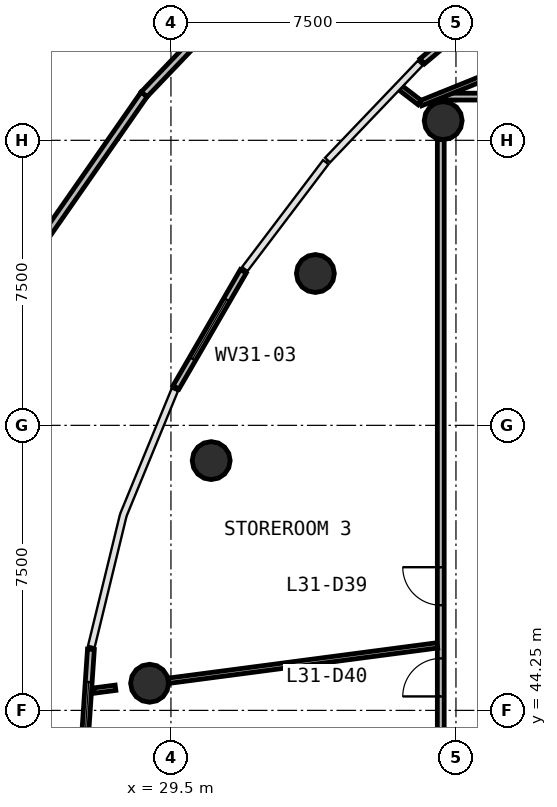
"""IFC4 building model, lengths in metres.
Left out: names, types, materials, properties, quantities, classifications, styles, units other than length and angle.
Written with IfcOpenShell. Run it as: python <this file> out.ifc"""

import sys

from ifc_helpers import new_model, si_unit, direction, frame, frame_2d, origin, origin_2d, place, context, subcontext, project, spatial, rectangle, circle, extrude, source, transform, mapped, element, fill, save


model = new_model("IFC4")
c1 = context("Model", 3, precision=1e-05, world=origin(), true_north=direction((0.0, 1.0)))
c2 = subcontext(c1, "Body", "Model", "MODEL_VIEW")
j1 = project(units=[si_unit("LENGTHUNIT", "METRE"), si_unit("PLANEANGLEUNIT", "RADIAN")], contexts=[c1])
p1 = place(None, origin())
s1 = spatial("IfcSite", under=j1, at=p1, CompositionType="ELEMENT")
p2 = place(p1, origin())
s2 = spatial("IfcBuilding", under=s1, at=p2, CompositionType="ELEMENT")
p3 = place(p2, frame((0.0, 0.0, 133.1)))
s3 = spatial("IfcBuildingStorey", under=s2, at=p3, CompositionType="ELEMENT", Elevation=133.1)
m1 = source(origin(), c2, "Body", "SweptSolid", [
    extrude(circle(Radius=0.5, at=origin_2d()), origin(), (0.0, 0.0, 1.0), 4.22),
])
for number, where, z_axis, x_axis in (
    (1, (36.664, 59.768, -0.32), (0.0, 0.0, 1.0), (1.0, 0.0, 0.0)),
    (2, (33.301, 55.746, -0.32), (0.0, 0.0, 1.0), (1.0, 0.0, 0.0)),
    (3, (30.559, 50.823, -0.32), (0.0, 0.0, 1.0), (1.0, 0.0, 0.0)),
    (4, (28.938, 44.964, -0.32), (0.0, 0.0, 1.0), (1.0, 0.0, 0.0)),
):
    element("IfcColumn", number, at=place(p3, frame(where, z_axis=z_axis, x_axis=x_axis)), inside=s3, PredefinedType="COLUMN", context=c2, shape_type="MappedRepresentation", body=[
        mapped(m1, transform((0.0, 0.0, 0.0), scale=1.0)),
    ])
p4 = place(p3, frame((38.813, 63.602, 0.0), z_axis=(0.0, 0.0, 1.0), x_axis=(-0.765266094185, -0.643714070913, 0.0)))
e5 = element("IfcWall", 5, at=p4, inside=s3, PredefinedType="STANDARD", context=c2, shape_type="SweptSolid", body=[
    extrude(rectangle(XDim=3.531, YDim=0.18, at=frame_2d((1.766, 0.0))), origin(), (0.0, 0.0, 1.0), 3.58),
])
p5 = place(p4, frame((0.865, 0.0, 0.9)))
e6 = element("IfcOpeningElement", 6, at=p5, cuts=e5, PredefinedType="OPENING", context=c2, shape_type="SweptSolid", body=[
    extrude(rectangle(XDim=1.8, YDim=2.1, at=frame_2d((0.9, 1.05))), frame((0.0, 0.1, 0.0), z_axis=(0.0, -1.0, 0.0), x_axis=(1.0, 0.0, 0.0)), (0.0, 0.0, 1.0), 0.2),
])
p6 = place(p3, frame((31.404, 55.804, 0.0), z_axis=(0.0, 0.0, 1.0), x_axis=(-0.501551441293, -0.865127823929, 0.0)))
e7 = element("IfcWall", 7, at=p6, inside=s3, PredefinedType="STANDARD", context=c2, shape_type="SweptSolid", body=[
    extrude(rectangle(XDim=3.53, YDim=0.18, at=frame_2d((1.765, 0.0))), origin(), (0.0, 0.0, 1.0), 3.58),
])
p7 = place(p6, frame((0.865, 0.0, 0.9)))
e8 = element("IfcOpeningElement", 8, at=p7, cuts=e7, PredefinedType="OPENING", context=c2, shape_type="SweptSolid", body=[
    extrude(rectangle(XDim=1.8, YDim=2.1, at=frame_2d((0.9, 1.05))), frame((0.0, 0.1, 0.0), z_axis=(0.0, -1.0, 0.0), x_axis=(1.0, 0.0, 0.0)), (0.0, 0.0, 1.0), 0.2),
])
p8 = place(p3, frame((27.394, 45.859, 0.0), z_axis=(0.0, 0.0, 1.0), x_axis=(-0.067272341836, -0.997734650107, 0.0)))
e9 = element("IfcWall", 9, at=p8, inside=s3, PredefinedType="STANDARD", context=c2, shape_type="SweptSolid", body=[
    extrude(rectangle(XDim=3.528, YDim=0.18, at=frame_2d((1.764, 0.0))), origin(), (0.0, 0.0, 1.0), 3.58),
])
p9 = place(p8, frame((0.864, 0.0, 0.9)))
e10 = element("IfcOpeningElement", 10, at=p9, cuts=e9, PredefinedType="OPENING", context=c2, shape_type="SweptSolid", body=[
    extrude(rectangle(XDim=1.8, YDim=2.1, at=frame_2d((0.9, 1.05))), frame((0.0, 0.1, 0.0), z_axis=(0.0, -1.0, 0.0), x_axis=(1.0, 0.0, 0.0)), (0.0, 0.0, 1.0), 0.2),
])
p10 = place(p3, frame((25.448, 55.653, 0.0), z_axis=(0.0, 0.0, 1.0), x_axis=(0.571368470794, 0.820693652091, 0.0)))
e11 = element("IfcWall", 11, at=p10, inside=s3, PredefinedType="PARAPET", context=c2, shape_type="SweptSolid", body=[
    extrude(rectangle(XDim=5.859, YDim=0.2, at=frame_2d((2.929, 0.0))), origin(), (0.0, 0.0, 1.0), 1.1),
])
p11 = place(p3, frame((28.796, 60.461, 0.0), z_axis=(0.0, 0.0, 1.0), x_axis=(0.690863095069, 0.722985604194, 0.0)))
e12 = element("IfcWall", 12, at=p11, inside=s3, PredefinedType="PARAPET", context=c2, shape_type="SweptSolid", body=[
    extrude(rectangle(XDim=5.86, YDim=0.2, at=frame_2d((2.93, 0.0))), origin(), (0.0, 0.0, 1.0), 1.1),
])
p12 = place(p3, frame((36.6, 60.4, 0.0), z_axis=(0.0, 0.0, 1.0), x_axis=(1.0, 0.0, 0.0)))
e13 = element("IfcWall", 13, at=p12, inside=s3, PredefinedType="PARTITIONING", context=c2, shape_type="SweptSolid", body=[
    extrude(rectangle(XDim=30.8, YDim=0.18, at=frame_2d((15.4, 0.0))), origin(), (0.0, 0.0, 1.0), 2.88),
])
p13 = place(p12, frame((22.25, 0.0, 0.0)))
e14 = element("IfcOpeningElement", 14, at=p13, cuts=e13, PredefinedType="OPENING", context=c2, shape_type="SweptSolid", body=[
    extrude(rectangle(XDim=0.9, YDim=2.1, at=frame_2d((0.45, 1.05))), frame((0.0, 0.1, 0.0), z_axis=(0.0, -1.0, 0.0), x_axis=(1.0, 0.0, 0.0)), (0.0, 0.0, 1.0), 0.2),
])
p14 = place(p12, frame((19.65, 0.0, 0.0)))
e15 = element("IfcOpeningElement", 15, at=p14, cuts=e13, PredefinedType="OPENING", context=c2, shape_type="SweptSolid", body=[
    extrude(rectangle(XDim=0.9, YDim=2.1, at=frame_2d((0.45, 1.05))), frame((0.0, 0.1, 0.0), z_axis=(0.0, -1.0, 0.0), x_axis=(1.0, 0.0, 0.0)), (0.0, 0.0, 1.0), 0.2),
])
p15 = place(p12, frame((17.25, 0.0, 0.0)))
e16 = element("IfcOpeningElement", 16, at=p15, cuts=e13, PredefinedType="OPENING", context=c2, shape_type="SweptSolid", body=[
    extrude(rectangle(XDim=0.9, YDim=2.1, at=frame_2d((0.45, 1.05))), frame((0.0, 0.1, 0.0), z_axis=(0.0, -1.0, 0.0), x_axis=(1.0, 0.0, 0.0)), (0.0, 0.0, 1.0), 0.2),
])
p16 = place(p12, frame((14.95, 0.0, 0.0)))
e17 = element("IfcOpeningElement", 17, at=p16, cuts=e13, PredefinedType="OPENING", context=c2, shape_type="SweptSolid", body=[
    extrude(rectangle(XDim=1.0, YDim=2.1, at=frame_2d((0.5, 1.05))), frame((0.0, 0.1, 0.0), z_axis=(0.0, -1.0, 0.0), x_axis=(1.0, 0.0, 0.0)), (0.0, 0.0, 1.0), 0.2),
])
p17 = place(p12, frame((8.95, 0.0, 0.0)))
e18 = element("IfcOpeningElement", 18, at=p17, cuts=e13, PredefinedType="OPENING", context=c2, shape_type="SweptSolid", body=[
    extrude(rectangle(XDim=1.0, YDim=2.1, at=frame_2d((0.5, 1.05))), frame((0.0, 0.1, 0.0), z_axis=(0.0, -1.0, 0.0), x_axis=(1.0, 0.0, 0.0)), (0.0, 0.0, 1.0), 0.2),
])
p18 = place(p3, frame((36.6, 35.63, 0.0), z_axis=(0.0, 0.0, 1.0), x_axis=(0.0, 1.0, 0.0)))
e19 = element("IfcWall", 19, at=p18, inside=s3, PredefinedType="PARTITIONING", context=c2, shape_type="SweptSolid", body=[
    extrude(rectangle(XDim=23.638, YDim=0.18, at=frame_2d((11.819, 0.0))), origin(), (0.0, 0.0, 1.0), 2.88),
])
p19 = place(p18, frame((11.387, 0.0, 0.0)))
e20 = element("IfcOpeningElement", 20, at=p19, cuts=e19, PredefinedType="OPENING", context=c2, shape_type="SweptSolid", body=[
    extrude(rectangle(XDim=1.0, YDim=2.1, at=frame_2d((0.5, 1.05))), frame((0.0, 0.1, 0.0), z_axis=(0.0, -1.0, 0.0), x_axis=(1.0, 0.0, 0.0)), (0.0, 0.0, 1.0), 0.2),
])
p20 = place(p18, frame((8.988, 0.0, 0.0)))
e21 = element("IfcOpeningElement", 21, at=p20, cuts=e19, PredefinedType="OPENING", context=c2, shape_type="SweptSolid", body=[
    extrude(rectangle(XDim=1.0, YDim=2.1, at=frame_2d((0.5, 1.05))), frame((0.0, 0.1, 0.0), z_axis=(0.0, -1.0, 0.0), x_axis=(1.0, 0.0, 0.0)), (0.0, 0.0, 1.0), 0.2),
])
p21 = place(p18, frame((4.587, 0.0, 0.0)))
e22 = element("IfcOpeningElement", 22, at=p21, cuts=e19, PredefinedType="OPENING", context=c2, shape_type="SweptSolid", body=[
    extrude(rectangle(XDim=1.0, YDim=2.1, at=frame_2d((0.5, 1.05))), frame((0.0, 0.1, 0.0), z_axis=(0.0, -1.0, 0.0), x_axis=(1.0, 0.0, 0.0)), (0.0, 0.0, 1.0), 0.2),
])
p22 = place(p3, frame((36.51, 45.961, 0.0), z_axis=(0.0, 0.0, 1.0), x_axis=(-0.991447420849, -0.130506749601, 0.0)))
e23 = element("IfcWall", 23, at=p22, inside=s3, PredefinedType="PARTITIONING", context=c2, shape_type="SweptSolid", body=[
    extrude(rectangle(XDim=7.133, YDim=0.14, at=frame_2d((3.566, 0.0))), origin(), (0.0, 0.0, 1.0), 2.88),
])
p23 = place(p3, frame((36.07, 60.223, 0.0), z_axis=(0.0, 0.0, 1.0), x_axis=(0.927241534836, 0.374463798084, 0.0)))
e24 = element("IfcWall", 24, at=p23, inside=s3, PredefinedType="PARTITIONING", context=c2, shape_type="SweptSolid", body=[
    extrude(rectangle(XDim=5.393, YDim=0.14, at=frame_2d((2.697, 0.0))), origin(), (0.0, 0.0, 1.0), 2.88),
])
p24 = place(p23, frame((2.943, 0.0, 0.0)))
e25 = element("IfcOpeningElement", 25, at=p24, cuts=e24, PredefinedType="OPENING", context=c2, shape_type="SweptSolid", body=[
    extrude(rectangle(XDim=1.0, YDim=2.1, at=frame_2d((0.5, 1.05))), frame((0.0, 0.08, 0.0), z_axis=(0.0, -1.0, 0.0), x_axis=(1.0, 0.0, 0.0)), (0.0, 0.0, 1.0), 0.16),
])
p25 = place(p3, frame((28.041, 44.846, 0.0), z_axis=(0.0, 0.0, 1.0), x_axis=(-0.99145719693, -0.130432460129, 0.0)))
e26 = element("IfcWall", 26, at=p25, inside=s3, PredefinedType="PARTITIONING", context=c2, shape_type="SweptSolid", body=[
    extrude(rectangle(XDim=0.573, YDim=0.14, at=frame_2d((0.286, 0.0))), origin(), (0.0, 0.0, 1.0), 2.88),
])
p26 = place(p3, frame((36.046, 60.242, 0.0), z_axis=(0.0, 0.0, 1.0), x_axis=(-0.793476968481, 0.608600279732, 0.0)))
e27 = element("IfcWall", 27, at=p26, inside=s3, PredefinedType="PARTITIONING", context=c2, shape_type="SweptSolid", body=[
    extrude(rectangle(XDim=0.638, YDim=0.14, at=frame_2d((0.319, 0.0))), origin(), (0.0, 0.0, 1.0), 2.88),
])
m2 = source(origin(), c2, "Body", "SweptSolid", [
    extrude(rectangle(XDim=1.8, YDim=2.1, at=frame_2d((0.9, 1.05))), frame((0.0, 0.03, 0.0), z_axis=(0.0, -1.0, 0.0), x_axis=(1.0, 0.0, 0.0)), (0.0, 0.0, 1.0), 0.06),
])
p27 = place(p7, origin())
e28 = element("IfcWindow", 28, at=p27, inside=s3, PartitioningType="SINGLE_PANEL", PredefinedType="WINDOW", context=c2, shape_type="MappedRepresentation", body=[
    mapped(m2, transform((0.0, 0.0, 0.0), scale=1.0)),
])
fill(e8, e28)
p28 = place(p9, origin())
e29 = element("IfcWindow", 29, at=p28, inside=s3, PartitioningType="SINGLE_PANEL", PredefinedType="WINDOW", context=c2, shape_type="MappedRepresentation", body=[
    mapped(m2, transform((0.0, 0.0, 0.0), scale=1.0)),
])
fill(e10, e29)
m3 = source(origin(), c2, "Body", "SweptSolid", [
    extrude(rectangle(XDim=1.0, YDim=2.1, at=frame_2d((0.5, 1.05))), frame((0.0, 0.025, 0.0), z_axis=(0.0, -1.0, 0.0), x_axis=(1.0, 0.0, 0.0)), (0.0, 0.0, 1.0), 0.05),
])
p29 = place(p19, origin())
e30 = element("IfcDoor", 30, at=p29, inside=s3, OperationType="SINGLE_SWING_RIGHT", PredefinedType="DOOR", context=c2, shape_type="MappedRepresentation", body=[
    mapped(m3, transform((0.0, 0.0, 0.0), scale=1.0)),
])
fill(e20, e30)
p30 = place(p20, origin())
e31 = element("IfcDoor", 31, at=p30, inside=s3, OperationType="SINGLE_SWING_LEFT", PredefinedType="DOOR", context=c2, shape_type="MappedRepresentation", body=[
    mapped(m3, transform((0.0, 0.0, 0.0), scale=1.0)),
])
fill(e21, e31)
save(model, sys.argv[1])
